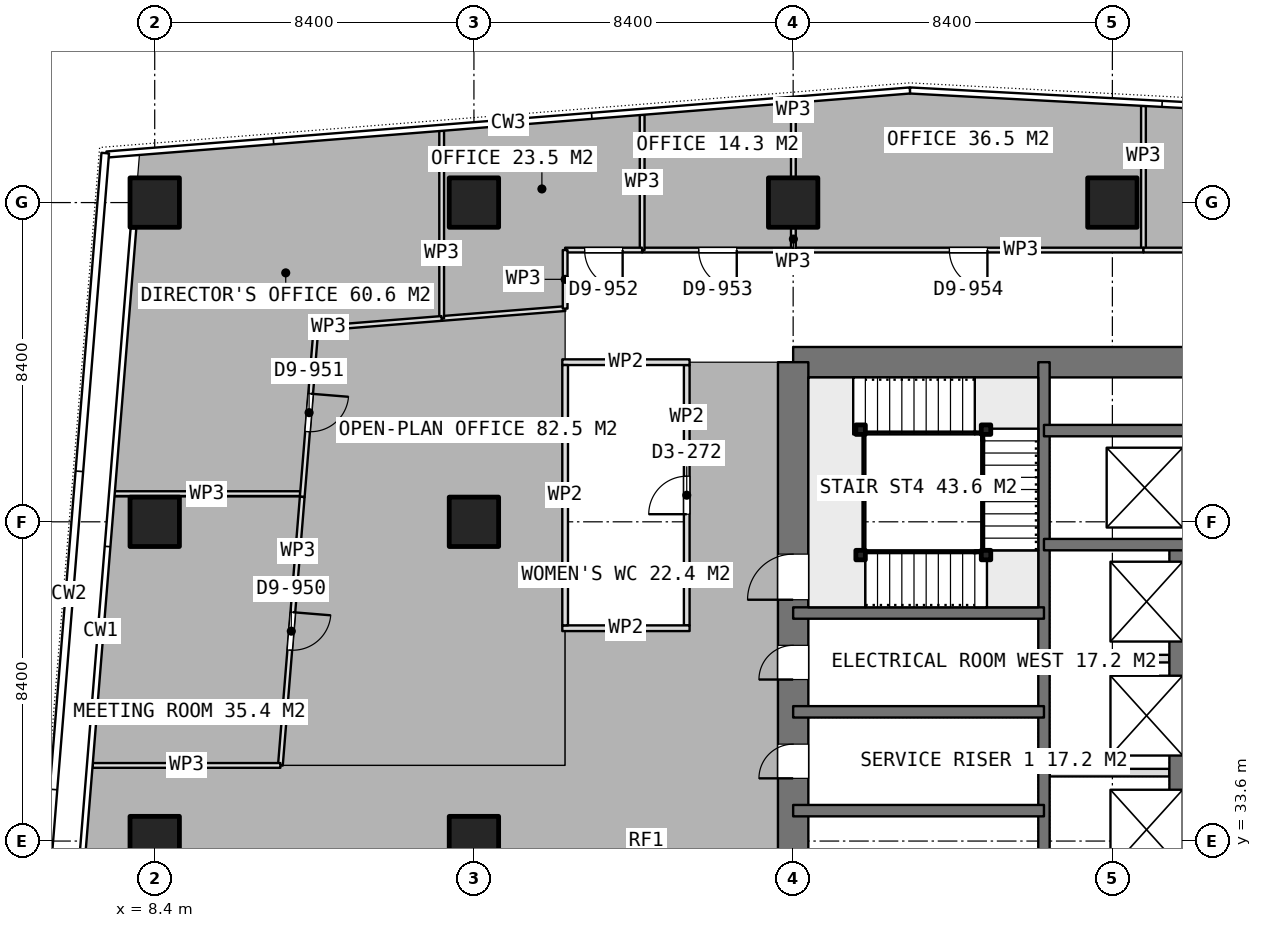
"""IFC4 building model, lengths in metres.
Left out: names, types, materials, properties, quantities, classifications, styles, units other than length and angle.
Written with IfcOpenShell. Run it as: python <this file> out.ifc"""

import sys

from ifc_helpers import new_model, si_unit, direction, frame, frame_2d, origin, origin_2d, place, context, subcontext, project, spatial, rectangle, extrude, element, fill, save


model = new_model("IFC4")
c1 = context("Model", 3, precision=1e-05, world=origin(), true_north=direction((0.0, 1.0)))
c2 = subcontext(c1, "Body", "Model", "MODEL_VIEW")
j1 = project(units=[si_unit("LENGTHUNIT", "METRE"), si_unit("PLANEANGLEUNIT", "RADIAN")], contexts=[c1])
p1 = place(None, origin())
s1 = spatial("IfcSite", under=j1, at=p1, CompositionType="ELEMENT")
p2 = place(p1, origin())
s2 = spatial("IfcBuilding", under=s1, at=p2, CompositionType="ELEMENT")
p3 = place(p2, frame((0.0, 0.0, 253.85)))
s3 = spatial("IfcBuildingStorey", under=s2, at=p3, CompositionType="ELEMENT", Elevation=253.85)
p4 = place(p3, frame((25.2, 46.2, 0.0), z_axis=(0.0, 0.0, 1.0), x_axis=(1.0, 0.0, 0.0)))
e1 = element("IfcWall", 1, at=p4, inside=s3, PredefinedType="SHEAR", context=c2, shape_type="SweptSolid", body=[
    extrude(rectangle(XDim=10.4, YDim=0.8, at=frame_2d((5.2, 0.0))), origin(), (0.0, 0.0, 1.0), 3.75),
])
p5 = place(p3, frame((25.2, 21.0, 0.0), z_axis=(0.0, 0.0, 1.0), x_axis=(0.0, 1.0, 0.0)))
e2 = element("IfcWall", 2, at=p5, inside=s3, PredefinedType="SHEAR", context=c2, shape_type="SweptSolid", body=[
    extrude(rectangle(XDim=25.2, YDim=0.8, at=frame_2d((12.6, 0.0))), origin(), (0.0, 0.0, 1.0), 3.75),
])
p6 = place(p5, frame((7.8, 0.0, 0.0)))
e3 = element("IfcOpeningElement", 3, at=p6, cuts=e2, PredefinedType="OPENING", context=c2, shape_type="SweptSolid", body=[
    extrude(rectangle(XDim=1.2, YDim=2.1, at=frame_2d((0.6, 1.05))), frame((0.0, 0.41, 0.0), z_axis=(0.0, -1.0, 0.0), x_axis=(1.0, 0.0, 0.0)), (0.0, 0.0, 1.0), 0.82),
])
p7 = place(p5, frame((14.25, 0.0, 0.0)))
e4 = element("IfcOpeningElement", 4, at=p7, cuts=e2, PredefinedType="OPENING", context=c2, shape_type="SweptSolid", body=[
    extrude(rectangle(XDim=0.9, YDim=2.1, at=frame_2d((0.45, 1.05))), frame((0.0, 0.41, 0.0), z_axis=(0.0, -1.0, 0.0), x_axis=(1.0, 0.0, 0.0)), (0.0, 0.0, 1.0), 0.82),
])
p8 = place(p5, frame((16.85, 0.0, 0.0)))
e5 = element("IfcOpeningElement", 5, at=p8, cuts=e2, PredefinedType="OPENING", context=c2, shape_type="SweptSolid", body=[
    extrude(rectangle(XDim=0.9, YDim=2.1, at=frame_2d((0.45, 1.05))), frame((0.0, 0.41, 0.0), z_axis=(0.0, -1.0, 0.0), x_axis=(1.0, 0.0, 0.0)), (0.0, 0.0, 1.0), 0.82),
])
p9 = place(p5, frame((18.95, 0.0, 0.0)))
e6 = element("IfcOpeningElement", 6, at=p9, cuts=e2, PredefinedType="OPENING", context=c2, shape_type="SweptSolid", body=[
    extrude(rectangle(XDim=1.2, YDim=2.1, at=frame_2d((0.6, 1.05))), frame((0.0, 0.41, 0.0), z_axis=(0.0, -1.0, 0.0), x_axis=(1.0, 0.0, 0.0)), (0.0, 0.0, 1.0), 0.82),
])
p10 = place(p3, frame((31.8, 21.0, 0.0), z_axis=(0.0, 0.0, 1.0), x_axis=(0.0, 1.0, 0.0)))
e7 = element("IfcWall", 7, at=p10, inside=s3, PredefinedType="SHEAR", context=c2, shape_type="SweptSolid", body=[
    extrude(rectangle(XDim=25.2, YDim=0.3, at=frame_2d((12.6, 0.0))), origin(), (0.0, 0.0, 1.0), 3.75),
])
p11 = place(p3, frame((35.6, 23.4, 0.0), z_axis=(0.0, 0.0, 1.0), x_axis=(0.0, 1.0, 0.0)))
e8 = element("IfcWall", 8, at=p11, inside=s3, PredefinedType="SHEAR", context=c2, shape_type="SweptSolid", body=[
    extrude(rectangle(XDim=18.0, YDim=1.0, at=frame_2d((9.0, 0.0))), origin(), (0.0, 0.0, 1.0), 3.75),
])
p12 = place(p11, frame((0.95, 0.0, 0.0)))
e9 = element("IfcOpeningElement", 9, at=p12, cuts=e8, PredefinedType="OPENING", context=c2, shape_type="SweptSolid", body=[
    extrude(rectangle(XDim=1.1, YDim=2.1, at=frame_2d((0.55, 1.05))), frame((0.0, 0.51, 0.0), z_axis=(0.0, -1.0, 0.0), x_axis=(1.0, 0.0, 0.0)), (0.0, 0.0, 1.0), 1.02),
])
p13 = place(p11, frame((3.95, 0.0, 0.0)))
e10 = element("IfcOpeningElement", 10, at=p13, cuts=e8, PredefinedType="OPENING", context=c2, shape_type="SweptSolid", body=[
    extrude(rectangle(XDim=1.1, YDim=2.1, at=frame_2d((0.55, 1.05))), frame((0.0, 0.51, 0.0), z_axis=(0.0, -1.0, 0.0), x_axis=(1.0, 0.0, 0.0)), (0.0, 0.0, 1.0), 1.02),
])
p14 = place(p11, frame((6.95, 0.0, 0.0)))
e11 = element("IfcOpeningElement", 11, at=p14, cuts=e8, PredefinedType="OPENING", context=c2, shape_type="SweptSolid", body=[
    extrude(rectangle(XDim=1.1, YDim=2.1, at=frame_2d((0.55, 1.05))), frame((0.0, 0.51, 0.0), z_axis=(0.0, -1.0, 0.0), x_axis=(1.0, 0.0, 0.0)), (0.0, 0.0, 1.0), 1.02),
])
p15 = place(p11, frame((9.95, 0.0, 0.0)))
e12 = element("IfcOpeningElement", 12, at=p15, cuts=e8, PredefinedType="OPENING", context=c2, shape_type="SweptSolid", body=[
    extrude(rectangle(XDim=1.1, YDim=2.1, at=frame_2d((0.55, 1.05))), frame((0.0, 0.51, 0.0), z_axis=(0.0, -1.0, 0.0), x_axis=(1.0, 0.0, 0.0)), (0.0, 0.0, 1.0), 1.02),
])
p16 = place(p11, frame((12.95, 0.0, 0.0)))
e13 = element("IfcOpeningElement", 13, at=p16, cuts=e8, PredefinedType="OPENING", context=c2, shape_type="SweptSolid", body=[
    extrude(rectangle(XDim=1.1, YDim=2.1, at=frame_2d((0.55, 1.05))), frame((0.0, 0.51, 0.0), z_axis=(0.0, -1.0, 0.0), x_axis=(1.0, 0.0, 0.0)), (0.0, 0.0, 1.0), 1.02),
])
p17 = place(p11, frame((15.95, 0.0, 0.0)))
e14 = element("IfcOpeningElement", 14, at=p17, cuts=e8, PredefinedType="OPENING", context=c2, shape_type="SweptSolid", body=[
    extrude(rectangle(XDim=1.1, YDim=2.1, at=frame_2d((0.55, 1.05))), frame((0.0, 0.51, 0.0), z_axis=(0.0, -1.0, 0.0), x_axis=(1.0, 0.0, 0.0)), (0.0, 0.0, 1.0), 1.02),
])
for number, where, z_axis, x_axis in (
    (15, (31.8, 41.4, 0.0), (0.0, 0.0, 1.0), (1.0, 0.0, 0.0)),
    (16, (31.8, 44.4, 0.0), (0.0, 0.0, 1.0), (1.0, 0.0, 0.0)),
):
    element("IfcWall", number, at=place(p3, frame(where, z_axis=z_axis, x_axis=x_axis)), inside=s3, PredefinedType="SHEAR", context=c2, shape_type="SweptSolid", body=[
        extrude(rectangle(XDim=3.8, YDim=0.3, at=frame_2d((1.9, 0.0))), origin(), (0.0, 0.0, 1.0), 3.75),
    ])
for number, where, z_axis, x_axis in (
    (17, (25.2, 34.4, 0.0), (0.0, 0.0, 1.0), (1.0, 0.0, 0.0)),
    (18, (25.2, 37.0, 0.0), (0.0, 0.0, 1.0), (1.0, 0.0, 0.0)),
    (19, (25.2, 39.6, 0.0), (0.0, 0.0, 1.0), (1.0, 0.0, 0.0)),
):
    element("IfcWall", number, at=place(p3, frame(where, z_axis=z_axis, x_axis=x_axis)), inside=s3, PredefinedType="SHEAR", context=c2, shape_type="SweptSolid", body=[
        extrude(rectangle(XDim=6.6, YDim=0.3, at=frame_2d((3.3, 0.0))), origin(), (0.0, 0.0, 1.0), 3.75),
    ])
for number, where, z_axis, x_axis in (
    (20, (8.4, 33.6, 0.0), (0.0, 0.0, 1.0), (1.0, 0.0, 0.0)),
    (21, (8.4, 42.0, 0.0), (0.0, 0.0, 1.0), (1.0, 0.0, 0.0)),
    (22, (8.4, 50.4, 0.0), (0.0, 0.0, 1.0), (1.0, 0.0, 0.0)),
    (23, (16.8, 33.6, 0.0), (0.0, 0.0, 1.0), (1.0, 0.0, 0.0)),
    (24, (16.8, 42.0, 0.0), (0.0, 0.0, 1.0), (1.0, 0.0, 0.0)),
    (25, (16.8, 50.4, 0.0), (0.0, 0.0, 1.0), (1.0, 0.0, 0.0)),
    (26, (25.2, 50.4, 0.0), (0.0, 0.0, 1.0), (1.0, 0.0, 0.0)),
    (27, (33.6, 50.4, 0.0), (0.0, 0.0, 1.0), (1.0, 0.0, 0.0)),
):
    element("IfcColumn", number, at=place(p3, frame(where, z_axis=z_axis, x_axis=x_axis)), inside=s3, PredefinedType="COLUMN", context=c2, shape_type="SweptSolid", body=[
        extrude(rectangle(XDim=1.3, YDim=1.3, at=origin_2d()), origin(), (0.0, 0.0, 1.0), 3.75),
    ])
for number, where, z_axis, x_axis in (
    (28, (31.95, 35.4, 0.0), (0.0, 0.0, 1.0), (1.0, 0.0, 0.0)),
    (29, (31.95, 38.4, 0.0), (0.0, 0.0, 1.0), (1.0, 0.0, 0.0)),
):
    element("IfcWall", number, at=place(p3, frame(where, z_axis=z_axis, x_axis=x_axis)), inside=s3, PredefinedType="PARTITIONING", context=c2, shape_type="SweptSolid", body=[
        extrude(rectangle(XDim=3.15, YDim=0.2, at=frame_2d((1.575, 0.0))), origin(), (0.0, 0.0, 1.0), 3.5),
    ])
for number, where, z_axis, x_axis in (
    (30, (19.125, 39.2, 0.0), (0.0, 0.0, 1.0), (1.0, 0.0, 0.0)),
    (31, (19.125, 46.2, 0.0), (0.0, 0.0, 1.0), (1.0, 0.0, 0.0)),
):
    element("IfcWall", number, at=place(p3, frame(where, z_axis=z_axis, x_axis=x_axis)), inside=s3, PredefinedType="PARTITIONING", context=c2, shape_type="SweptSolid", body=[
        extrude(rectangle(XDim=3.35, YDim=0.15, at=frame_2d((1.675, 0.0))), origin(), (0.0, 0.0, 1.0), 3.5),
    ])
p18 = place(p3, frame((19.2, 39.275, 0.0), z_axis=(0.0, 0.0, 1.0), x_axis=(0.0, 1.0, 0.0)))
e32 = element("IfcWall", 32, at=p18, inside=s3, PredefinedType="PARTITIONING", context=c2, shape_type="SweptSolid", body=[
    extrude(rectangle(XDim=6.85, YDim=0.15, at=frame_2d((3.425, 0.0))), origin(), (0.0, 0.0, 1.0), 3.5),
])
p19 = place(p3, frame((22.4, 39.275, 0.0), z_axis=(0.0, 0.0, 1.0), x_axis=(0.0, 1.0, 0.0)))
e33 = element("IfcWall", 33, at=p19, inside=s3, PredefinedType="PARTITIONING", context=c2, shape_type="SweptSolid", body=[
    extrude(rectangle(XDim=6.85, YDim=0.15, at=frame_2d((3.425, 0.0))), origin(), (0.0, 0.0, 1.0), 3.5),
])
p20 = place(p19, frame((2.925, 0.0, 0.0)))
e34 = element("IfcOpeningElement", 34, at=p20, cuts=e33, PredefinedType="OPENING", context=c2, shape_type="SweptSolid", body=[
    extrude(rectangle(XDim=1.0, YDim=2.1, at=frame_2d((0.5, 1.05))), frame((0.0, 0.085, 0.0), z_axis=(0.0, -1.0, 0.0), x_axis=(1.0, 0.0, 0.0)), (0.0, 0.0, 1.0), 0.17),
])
p21 = place(p3, frame((42.889, 49.15, 0.0), z_axis=(0.0, 0.0, 1.0), x_axis=(-1.0, 0.0, 0.0)))
e35 = element("IfcWall", 35, at=p21, inside=s3, PredefinedType="PARTITIONING", context=c2, shape_type="SweptSolid", body=[
    extrude(rectangle(XDim=8.471, YDim=0.125, at=frame_2d((4.235, 0.0))), origin(), (0.0, 0.0, 1.0), 3.5),
])
p22 = place(p21, frame((3.736, 0.0, 0.0)))
e36 = element("IfcOpeningElement", 36, at=p22, cuts=e35, PredefinedType="OPENING", context=c2, shape_type="SweptSolid", body=[
    extrude(rectangle(XDim=1.0, YDim=2.1, at=frame_2d((0.5, 1.05))), frame((0.0, 0.073, 0.0), z_axis=(0.0, -1.0, 0.0), x_axis=(1.0, 0.0, 0.0)), (0.0, 0.0, 1.0), 0.145),
])
p23 = place(p3, frame((34.418, 49.15, 0.0), z_axis=(0.0, 0.0, 1.0), x_axis=(0.0, 1.0, 0.0)))
e37 = element("IfcWall", 37, at=p23, inside=s3, PredefinedType="PARTITIONING", context=c2, shape_type="SweptSolid", body=[
    extrude(rectangle(XDim=3.793, YDim=0.125, at=frame_2d((1.896, 0.0))), origin(), (0.0, 0.0, 1.0), 3.5),
])
p24 = place(p3, frame((34.417, 49.15, 0.0), z_axis=(0.0, 0.0, 1.0), x_axis=(-1.0, 0.0, 0.0)))
e38 = element("IfcWall", 38, at=p24, inside=s3, PredefinedType="PARTITIONING", context=c2, shape_type="SweptSolid", body=[
    extrude(rectangle(XDim=9.211, YDim=0.125, at=frame_2d((4.605, 0.0))), origin(), (0.0, 0.0, 1.0), 3.5),
])
p25 = place(p24, frame((4.105, 0.0, 0.0)))
e39 = element("IfcOpeningElement", 39, at=p25, cuts=e38, PredefinedType="OPENING", context=c2, shape_type="SweptSolid", body=[
    extrude(rectangle(XDim=1.0, YDim=2.1, at=frame_2d((0.5, 1.05))), frame((0.0, 0.073, 0.0), z_axis=(0.0, -1.0, 0.0), x_axis=(1.0, 0.0, 0.0)), (0.0, 0.0, 1.0), 0.145),
])
p26 = place(p3, frame((25.206, 49.15, 0.0), z_axis=(0.0, 0.0, 1.0), x_axis=(0.0, 1.0, 0.0)))
e40 = element("IfcWall", 40, at=p26, inside=s3, PredefinedType="PARTITIONING", context=c2, shape_type="SweptSolid", body=[
    extrude(rectangle(XDim=0.58, YDim=0.125, at=frame_2d((0.29, 0.0))), origin(), (0.0, 0.0, 1.0), 3.5),
])
p27 = place(p3, frame((25.206, 51.07, 0.0), z_axis=(0.0, 0.0, 1.0), x_axis=(0.0, 1.0, 0.0)))
e41 = element("IfcWall", 41, at=p27, inside=s3, PredefinedType="PARTITIONING", context=c2, shape_type="SweptSolid", body=[
    extrude(rectangle(XDim=1.955, YDim=0.125, at=frame_2d((0.978, 0.0))), origin(), (0.0, 0.0, 1.0), 3.5),
])
p28 = place(p3, frame((25.205, 49.15, 0.0), z_axis=(0.0, 0.0, 1.0), x_axis=(-1.0, 0.0, 0.0)))
e42 = element("IfcWall", 42, at=p28, inside=s3, PredefinedType="PARTITIONING", context=c2, shape_type="SweptSolid", body=[
    extrude(rectangle(XDim=3.978, YDim=0.125, at=frame_2d((1.989, 0.0))), origin(), (0.0, 0.0, 1.0), 3.5),
])
p29 = place(p28, frame((1.489, 0.0, 0.0)))
e43 = element("IfcOpeningElement", 43, at=p29, cuts=e42, PredefinedType="OPENING", context=c2, shape_type="SweptSolid", body=[
    extrude(rectangle(XDim=1.0, YDim=2.1, at=frame_2d((0.5, 1.05))), frame((0.0, 0.073, 0.0), z_axis=(0.0, -1.0, 0.0), x_axis=(1.0, 0.0, 0.0)), (0.0, 0.0, 1.0), 0.145),
])
p30 = place(p3, frame((21.227, 49.15, 0.0), z_axis=(0.0, 0.0, 1.0), x_axis=(0.0, 1.0, 0.0)))
e44 = element("IfcWall", 44, at=p30, inside=s3, PredefinedType="PARTITIONING", context=c2, shape_type="SweptSolid", body=[
    extrude(rectangle(XDim=3.558, YDim=0.125, at=frame_2d((1.779, 0.0))), origin(), (0.0, 0.0, 1.0), 3.5),
])
p31 = place(p3, frame((19.2, 47.61, 0.0), z_axis=(0.0, 0.0, 1.0), x_axis=(-0.99683691537, -0.079474298708, 0.0)))
e45 = element("IfcWall", 45, at=p31, inside=s3, PredefinedType="PARTITIONING", context=c2, shape_type="SweptSolid", body=[
    extrude(rectangle(XDim=3.259, YDim=0.125, at=frame_2d((1.63, 0.0))), origin(), (0.0, 0.0, 1.0), 3.5),
])
p32 = place(p3, frame((15.951, 47.351, 0.0), z_axis=(0.0, 0.0, 1.0), x_axis=(0.0, 1.0, 0.0)))
e46 = element("IfcWall", 46, at=p32, inside=s3, PredefinedType="PARTITIONING", context=c2, shape_type="SweptSolid", body=[
    extrude(rectangle(XDim=4.936, YDim=0.125, at=frame_2d((2.468, 0.0))), origin(), (0.0, 0.0, 1.0), 3.5),
])
p33 = place(p3, frame((21.226, 49.15, 0.0), z_axis=(0.0, 0.0, 1.0), x_axis=(-1.0, 0.0, 0.0)))
e47 = element("IfcWall", 47, at=p33, inside=s3, PredefinedType="PARTITIONING", context=c2, shape_type="SweptSolid", body=[
    extrude(rectangle(XDim=2.026, YDim=0.125, at=frame_2d((1.013, 0.0))), origin(), (0.0, 0.0, 1.0), 3.5),
])
p34 = place(p33, frame((0.513, 0.0, 0.0)))
e48 = element("IfcOpeningElement", 48, at=p34, cuts=e47, PredefinedType="OPENING", context=c2, shape_type="SweptSolid", body=[
    extrude(rectangle(XDim=1.0, YDim=2.1, at=frame_2d((0.5, 1.05))), frame((0.0, 0.073, 0.0), z_axis=(0.0, -1.0, 0.0), x_axis=(1.0, 0.0, 0.0)), (0.0, 0.0, 1.0), 0.145),
])
p35 = place(p3, frame((19.2, 49.15, 0.0), z_axis=(0.0, 0.0, 1.0), x_axis=(0.0, -1.0, 0.0)))
e49 = element("IfcWall", 49, at=p35, inside=s3, PredefinedType="PARTITIONING", context=c2, shape_type="SweptSolid", body=[
    extrude(rectangle(XDim=1.54, YDim=0.125, at=frame_2d((0.77, 0.0))), origin(), (0.0, 0.0, 1.0), 3.5),
])
p36 = place(p3, frame((12.226, 42.742, 0.0), z_axis=(0.0, 0.0, 1.0), x_axis=(-1.0, 0.0, 0.0)))
e50 = element("IfcWall", 50, at=p36, inside=s3, PredefinedType="PARTITIONING", context=c2, shape_type="SweptSolid", body=[
    extrude(rectangle(XDim=4.903, YDim=0.125, at=frame_2d((2.452, 0.0))), origin(), (0.0, 0.0, 1.0), 3.5),
])
p37 = place(p3, frame((15.95, 47.351, 0.0), z_axis=(0.0, 0.0, 1.0), x_axis=(-0.99682463174, -0.07962822086, 0.0)))
e51 = element("IfcWall", 51, at=p37, inside=s3, PredefinedType="PARTITIONING", context=c2, shape_type="SweptSolid", body=[
    extrude(rectangle(XDim=3.317, YDim=0.125, at=frame_2d((1.659, 0.0))), origin(), (0.0, 0.0, 1.0), 3.5),
])
p38 = place(p3, frame((12.643, 47.087, 0.0), z_axis=(0.0, 0.0, 1.0), x_axis=(-0.081240627764, -0.996694517092, 0.0)))
e52 = element("IfcWall", 52, at=p38, inside=s3, PredefinedType="PARTITIONING", context=c2, shape_type="SweptSolid", body=[
    extrude(rectangle(XDim=4.445, YDim=0.125, at=frame_2d((2.222, 0.0))), origin(), (0.0, 0.0, 1.0), 3.5),
])
p39 = place(p38, frame((1.722, 0.0, 0.0)))
e53 = element("IfcOpeningElement", 53, at=p39, cuts=e52, PredefinedType="OPENING", context=c2, shape_type="SweptSolid", body=[
    extrude(rectangle(XDim=1.0, YDim=2.1, at=frame_2d((0.5, 1.05))), frame((0.0, 0.073, 0.0), z_axis=(0.0, -1.0, 0.0), x_axis=(1.0, 0.0, 0.0)), (0.0, 0.0, 1.0), 0.145),
])
p40 = place(p3, frame((12.282, 42.656, 0.0), z_axis=(0.0, 0.0, 1.0), x_axis=(-0.08110159124, -0.996705840205, 0.0)))
e54 = element("IfcWall", 54, at=p40, inside=s3, PredefinedType="PARTITIONING", context=c2, shape_type="SweptSolid", body=[
    extrude(rectangle(XDim=7.089, YDim=0.125, at=frame_2d((3.545, 0.0))), origin(), (0.0, 0.0, 1.0), 3.5),
])
p41 = place(p40, frame((3.045, 0.0, 0.0)))
e55 = element("IfcOpeningElement", 55, at=p41, cuts=e54, PredefinedType="OPENING", context=c2, shape_type="SweptSolid", body=[
    extrude(rectangle(XDim=1.0, YDim=2.1, at=frame_2d((0.5, 1.05))), frame((0.0, 0.073, 0.0), z_axis=(0.0, -1.0, 0.0), x_axis=(1.0, 0.0, 0.0)), (0.0, 0.0, 1.0), 0.145),
])
p42 = place(p3, frame((11.707, 35.59, 0.0), z_axis=(0.0, 0.0, 1.0), x_axis=(-1.0, 0.0, 0.0)))
e56 = element("IfcWall", 56, at=p42, inside=s3, PredefinedType="PARTITIONING", context=c2, shape_type="SweptSolid", body=[
    extrude(rectangle(XDim=4.936, YDim=0.125, at=frame_2d((2.468, 0.0))), origin(), (0.0, 0.0, 1.0), 3.5),
])
for number, where, z_axis, x_axis in (
    (57, (26.975, 41.125, 0.0), (0.0, 0.0, 1.0), (1.0, 0.0, 0.0)),
    (58, (30.275, 41.125, 0.0), (0.0, 0.0, 1.0), (1.0, 0.0, 0.0)),
    (59, (30.275, 44.425, 0.0), (0.0, 0.0, 1.0), (1.0, 0.0, 0.0)),
    (60, (26.975, 44.425, 0.0), (0.0, 0.0, 1.0), (1.0, 0.0, 0.0)),
):
    element("IfcColumn", number, at=place(p3, frame(where, z_axis=z_axis, x_axis=x_axis)), inside=s3, PredefinedType="COLUMN", context=c2, shape_type="SweptSolid", body=[
        extrude(rectangle(XDim=0.25, YDim=0.25, at=origin_2d()), origin(), (0.0, 0.0, 1.0), 3.75),
    ])
p43 = place(p7, origin())
e61 = element("IfcDoor", 61, at=p43, inside=s3, OperationType="SINGLE_SWING_LEFT", PredefinedType="DOOR", context=c2, shape_type="SweptSolid", body=[
    extrude(rectangle(XDim=0.9, YDim=2.1, at=frame_2d((0.45, 1.05))), frame((0.0, 0.025, 0.0), z_axis=(0.0, -1.0, 0.0), x_axis=(1.0, 0.0, 0.0)), (0.0, 0.0, 1.0), 0.05),
])
fill(e4, e61)
p44 = place(p8, origin())
e62 = element("IfcDoor", 62, at=p44, inside=s3, OperationType="SINGLE_SWING_LEFT", PredefinedType="DOOR", context=c2, shape_type="SweptSolid", body=[
    extrude(rectangle(XDim=0.9, YDim=2.1, at=frame_2d((0.45, 1.05))), frame((0.0, 0.025, 0.0), z_axis=(0.0, -1.0, 0.0), x_axis=(1.0, 0.0, 0.0)), (0.0, 0.0, 1.0), 0.05),
])
fill(e5, e62)
p45 = place(p20, origin())
e63 = element("IfcDoor", 63, at=p45, inside=s3, OperationType="SINGLE_SWING_LEFT", PredefinedType="DOOR", context=c2, shape_type="SweptSolid", body=[
    extrude(rectangle(XDim=1.0, YDim=2.1, at=frame_2d((0.5, 1.05))), frame((0.0, 0.025, 0.0), z_axis=(0.0, -1.0, 0.0), x_axis=(1.0, 0.0, 0.0)), (0.0, 0.0, 1.0), 0.05),
])
fill(e34, e63)
p46 = place(p25, origin())
e64 = element("IfcDoor", 64, at=p46, inside=s3, OperationType="SINGLE_SWING_LEFT", PredefinedType="DOOR", context=c2, shape_type="SweptSolid", body=[
    extrude(rectangle(XDim=1.0, YDim=2.1, at=frame_2d((0.5, 1.05))), frame((0.0, 0.025, 0.0), z_axis=(0.0, -1.0, 0.0), x_axis=(1.0, 0.0, 0.0)), (0.0, 0.0, 1.0), 0.05),
])
fill(e39, e64)
p47 = place(p29, origin())
e65 = element("IfcDoor", 65, at=p47, inside=s3, OperationType="SINGLE_SWING_LEFT", PredefinedType="DOOR", context=c2, shape_type="SweptSolid", body=[
    extrude(rectangle(XDim=1.0, YDim=2.1, at=frame_2d((0.5, 1.05))), frame((0.0, 0.025, 0.0), z_axis=(0.0, -1.0, 0.0), x_axis=(1.0, 0.0, 0.0)), (0.0, 0.0, 1.0), 0.05),
])
fill(e43, e65)
p48 = place(p34, origin())
e66 = element("IfcDoor", 66, at=p48, inside=s3, OperationType="SINGLE_SWING_LEFT", PredefinedType="DOOR", context=c2, shape_type="SweptSolid", body=[
    extrude(rectangle(XDim=1.0, YDim=2.1, at=frame_2d((0.5, 1.05))), frame((0.0, 0.025, 0.0), z_axis=(0.0, -1.0, 0.0), x_axis=(1.0, 0.0, 0.0)), (0.0, 0.0, 1.0), 0.05),
])
fill(e48, e66)
p49 = place(p39, origin())
e67 = element("IfcDoor", 67, at=p49, inside=s3, OperationType="SINGLE_SWING_LEFT", PredefinedType="DOOR", context=c2, shape_type="SweptSolid", body=[
    extrude(rectangle(XDim=1.0, YDim=2.1, at=frame_2d((0.5, 1.05))), frame((0.0, 0.025, 0.0), z_axis=(0.0, -1.0, 0.0), x_axis=(1.0, 0.0, 0.0)), (0.0, 0.0, 1.0), 0.05),
])
fill(e53, e67)
p50 = place(p41, origin())
e68 = element("IfcDoor", 68, at=p50, inside=s3, OperationType="SINGLE_SWING_LEFT", PredefinedType="DOOR", context=c2, shape_type="SweptSolid", body=[
    extrude(rectangle(XDim=1.0, YDim=2.1, at=frame_2d((0.5, 1.05))), frame((0.0, 0.025, 0.0), z_axis=(0.0, -1.0, 0.0), x_axis=(1.0, 0.0, 0.0)), (0.0, 0.0, 1.0), 0.05),
])
fill(e55, e68)
p51 = place(p9, origin())
e69 = element("IfcDoor", 69, at=p51, inside=s3, OperationType="SINGLE_SWING_RIGHT", PredefinedType="DOOR", context=c2, shape_type="SweptSolid", body=[
    extrude(rectangle(XDim=1.2, YDim=2.1, at=frame_2d((0.6, 1.05))), frame((0.0, 0.025, 0.0), z_axis=(0.0, -1.0, 0.0), x_axis=(1.0, 0.0, 0.0)), (0.0, 0.0, 1.0), 0.05),
])
fill(e6, e69)
save(model, sys.argv[1])
